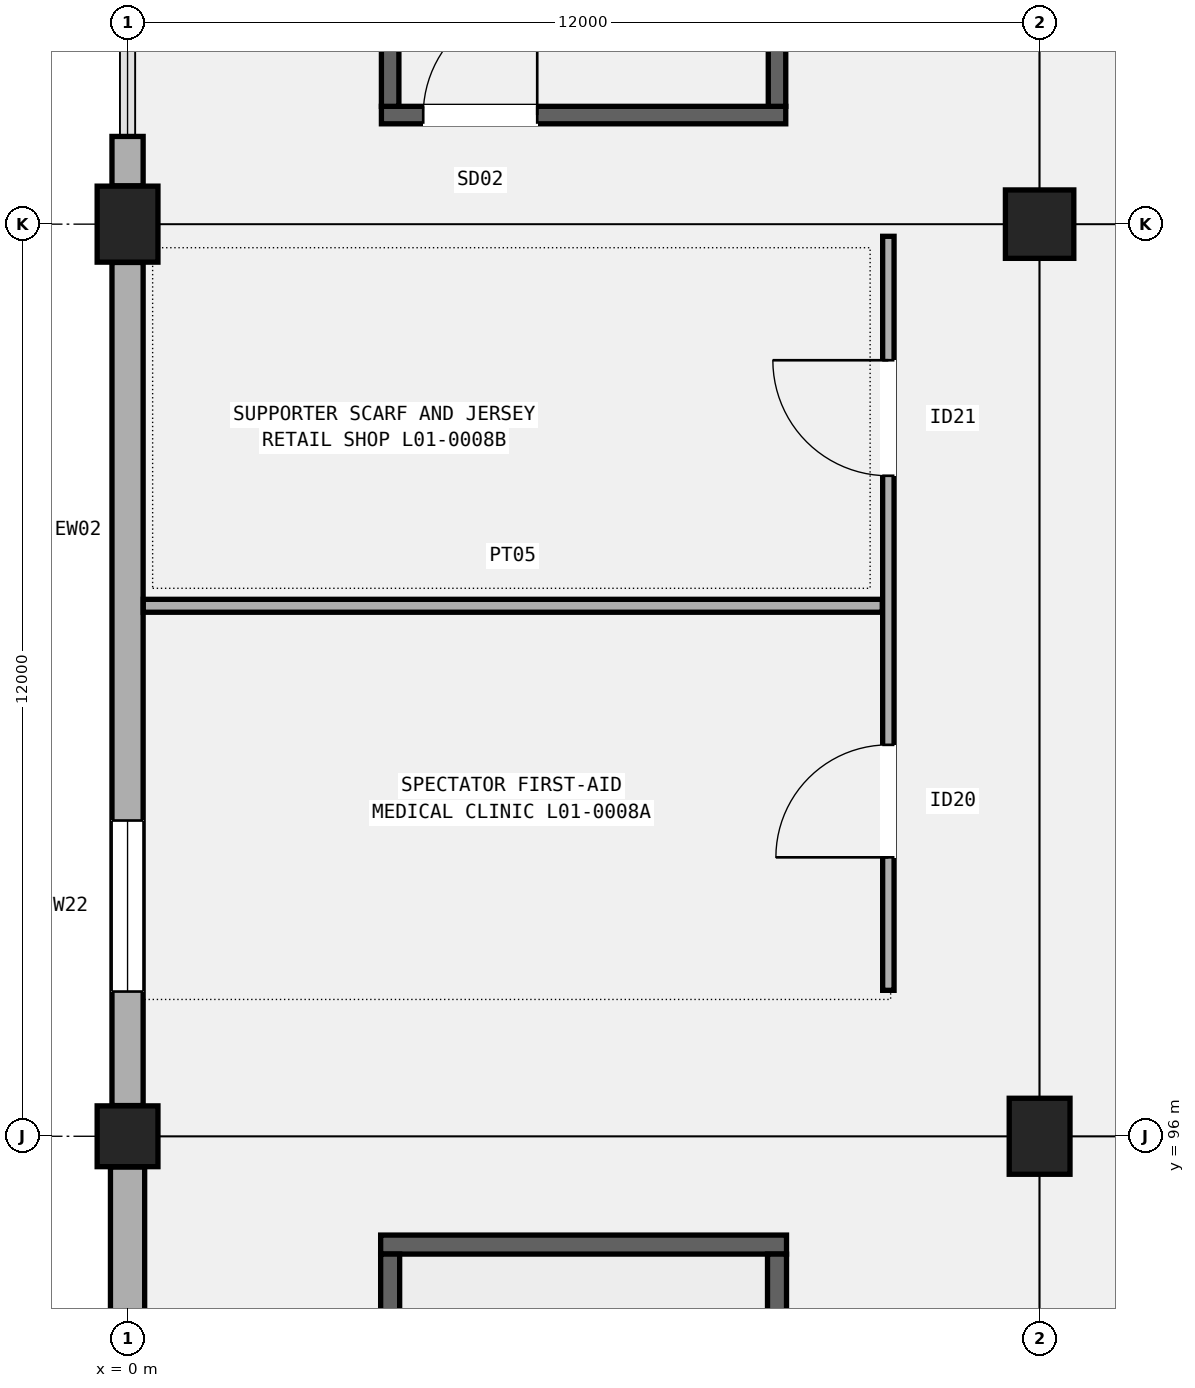
"""IFC4 building model, lengths in metres.
Left out: names, types, materials, properties, quantities, classifications, styles, units other than length and angle.
Written with IfcOpenShell. Run it as: python <this file> out.ifc"""

import sys

from ifc_helpers import new_model, si_unit, direction, frame, frame_2d, origin, origin_2d, place, context, subcontext, project, spatial, rectangle, extrude, element, fill, save


model = new_model("IFC4")
c1 = context("Model", 3, precision=1e-05, world=origin(), true_north=direction((0.0, 1.0)))
c2 = subcontext(c1, "Body", "Model", "MODEL_VIEW")
j1 = project(units=[si_unit("LENGTHUNIT", "METRE"), si_unit("PLANEANGLEUNIT", "RADIAN")], contexts=[c1])
p1 = place(None, origin())
s1 = spatial("IfcSite", under=j1, at=p1, CompositionType="ELEMENT")
p2 = place(p1, origin())
s2 = spatial("IfcBuilding", under=s1, at=p2, CompositionType="ELEMENT")
p3 = place(p2, frame((0.0, 0.0, 5.4)))
s3 = spatial("IfcBuildingStorey", under=s2, at=p3, CompositionType="ELEMENT", Elevation=5.4)
p4 = place(p3, frame((0.0, 96.0, 0.0), z_axis=(0.0, 0.0, 1.0), x_axis=(1.0, 0.0, 0.0)))
e1 = element("IfcColumn", 1, at=p4, inside=s3, PredefinedType="COLUMN", context=c2, shape_type="SweptSolid", body=[
    extrude(rectangle(XDim=0.8, YDim=0.8, at=origin_2d()), origin(), (0.0, 0.0, 1.0), 4.8),
])
for number, where, z_axis, x_axis in (
    (2, (0.0, 108.0, 0.0), (0.0, 0.0, 1.0), (1.0, 0.0, 0.0)),
    (3, (12.0, 96.0, 0.0), (0.0, 0.0, 1.0), (1.0, 0.0, 0.0)),
):
    element("IfcColumn", number, at=place(p3, frame(where, z_axis=z_axis, x_axis=x_axis)), inside=s3, PredefinedType="COLUMN", context=c2, shape_type="SweptSolid", body=[
        extrude(rectangle(XDim=0.8, YDim=1.0, at=origin_2d()), origin(), (0.0, 0.0, 1.0), 4.8),
    ])
p5 = place(p3, frame((12.0, 108.0, 0.0), z_axis=(0.0, 0.0, 1.0), x_axis=(1.0, 0.0, 0.0)))
e4 = element("IfcColumn", 4, at=p5, inside=s3, PredefinedType="COLUMN", context=c2, shape_type="SweptSolid", body=[
    extrude(rectangle(XDim=0.9, YDim=0.9, at=origin_2d()), origin(), (0.0, 0.0, 1.0), 4.8),
])
p6 = place(p3, frame((0.0, 84.454, 0.0), z_axis=(0.0, 0.0, 1.0), x_axis=(0.0, 1.0, 0.0)))
e5 = element("IfcWall", 5, at=p6, inside=s3, PredefinedType="SOLIDWALL", context=c2, shape_type="SweptSolid", body=[
    extrude(rectangle(XDim=11.142, YDim=0.45, at=frame_2d((5.571, 0.0))), origin(), (0.0, 0.0, 1.0), 4.2),
])
p7 = place(p6, frame((2.75, 0.0, 0.95)))
e6 = element("IfcOpeningElement", 6, at=p7, cuts=e5, PredefinedType="OPENING", context=c2, shape_type="SweptSolid", body=[
    extrude(rectangle(XDim=2.25, YDim=1.8, at=frame_2d((1.125, 0.9))), frame((0.0, 0.235, 0.0), z_axis=(0.0, -1.0, 0.0), x_axis=(1.0, 0.0, 0.0)), (0.0, 0.0, 1.0), 0.47),
])
p8 = place(p3, frame((0.0, 96.404, 0.0), z_axis=(0.0, 0.0, 1.0), x_axis=(0.0, 1.0, 0.0)))
e7 = element("IfcWall", 7, at=p8, inside=s3, PredefinedType="SOLIDWALL", context=c2, shape_type="SweptSolid", body=[
    extrude(rectangle(XDim=11.092, YDim=0.41, at=frame_2d((5.546, 0.0))), origin(), (0.0, 0.0, 1.0), 4.15),
])
p9 = place(p8, frame((1.5, 0.0, 0.95)))
e8 = element("IfcOpeningElement", 8, at=p9, cuts=e7, PredefinedType="OPENING", context=c2, shape_type="SweptSolid", body=[
    extrude(rectangle(XDim=2.25, YDim=2.2, at=frame_2d((1.125, 1.1))), frame((0.0, 0.215, 0.0), z_axis=(0.0, -1.0, 0.0), x_axis=(1.0, 0.0, 0.0)), (0.0, 0.0, 1.0), 0.43),
])
p10 = place(p3, frame((0.0, 108.504, 0.0), z_axis=(0.0, 0.0, 1.0), x_axis=(0.0, 1.0, 0.0)))
e9 = element("IfcWall", 9, at=p10, inside=s3, PredefinedType="SOLIDWALL", context=c2, shape_type="SweptSolid", body=[
    extrude(rectangle(XDim=0.65, YDim=0.41, at=frame_2d((0.325, 0.0))), origin(), (0.0, 0.0, 1.0), 4.2),
])
p11 = place(p3, frame((3.33, 94.575, 0.0), z_axis=(0.0, 0.0, 1.0), x_axis=(1.0, 0.0, 0.0)))
e10 = element("IfcWall", 10, at=p11, inside=s3, PredefinedType="SHEAR", context=c2, shape_type="SweptSolid", body=[
    extrude(rectangle(XDim=5.34, YDim=0.25, at=frame_2d((2.67, 0.0))), origin(), (0.0, 0.0, 1.0), 4.55),
])
for number, where, z_axis, x_axis in (
    (11, (3.455, 85.55, 0.0), (0.0, 0.0, 1.0), (0.0, 1.0, 0.0)),
    (12, (8.545, 85.55, 0.0), (0.0, 0.0, 1.0), (0.0, 1.0, 0.0)),
):
    element("IfcWall", number, at=place(p3, frame(where, z_axis=z_axis, x_axis=x_axis)), inside=s3, PredefinedType="SHEAR", context=c2, shape_type="SweptSolid", body=[
        extrude(rectangle(XDim=8.9, YDim=0.25, at=frame_2d((4.45, 0.0))), origin(), (0.0, 0.0, 1.0), 4.55),
    ])
p12 = place(p3, frame((3.34, 109.435, 0.0), z_axis=(0.0, 0.0, 1.0), x_axis=(1.0, 0.0, 0.0)))
e13 = element("IfcWall", 13, at=p12, inside=s3, PredefinedType="SHEAR", context=c2, shape_type="SweptSolid", body=[
    extrude(rectangle(XDim=5.32, YDim=0.23, at=frame_2d((2.66, 0.0))), origin(), (0.0, 0.0, 1.0), 4.55),
])
p13 = place(p12, frame((0.55, 0.0, 0.0)))
e14 = element("IfcOpeningElement", 14, at=p13, cuts=e13, PredefinedType="OPENING", context=c2, shape_type="SweptSolid", body=[
    extrude(rectangle(XDim=1.5, YDim=2.2, at=frame_2d((0.75, 1.1))), frame((0.0, 0.125, 0.0), z_axis=(0.0, -1.0, 0.0), x_axis=(1.0, 0.0, 0.0)), (0.0, 0.0, 1.0), 0.25),
])
for number, where, z_axis, x_axis in (
    (15, (3.455, 109.55, 0.0), (0.0, 0.0, 1.0), (0.0, 1.0, 0.0)),
    (16, (8.545, 109.55, 0.0), (0.0, 0.0, 1.0), (0.0, 1.0, 0.0)),
):
    element("IfcWall", number, at=place(p3, frame(where, z_axis=z_axis, x_axis=x_axis)), inside=s3, PredefinedType="SHEAR", context=c2, shape_type="SweptSolid", body=[
        extrude(rectangle(XDim=8.9, YDim=0.23, at=frame_2d((4.45, 0.0))), origin(), (0.0, 0.0, 1.0), 4.55),
    ])
p14 = place(p3, frame((10.01, 97.92, 0.0), z_axis=(0.0, 0.0, 1.0), x_axis=(0.0, 1.0, 0.0)))
e17 = element("IfcWall", 17, at=p14, inside=s3, PredefinedType="PARTITIONING", context=c2, shape_type="SweptSolid", body=[
    extrude(rectangle(XDim=9.92, YDim=0.15, at=frame_2d((4.96, 0.0))), origin(), (0.0, 0.0, 1.0), 3.92),
])
p15 = place(p14, frame((1.75, 0.0, 0.0)))
e18 = element("IfcOpeningElement", 18, at=p15, cuts=e17, PredefinedType="OPENING", context=c2, shape_type="SweptSolid", body=[
    extrude(rectangle(XDim=1.48, YDim=2.24, at=frame_2d((0.74, 1.12))), frame((0.0, 0.085, 0.0), z_axis=(0.0, -1.0, 0.0), x_axis=(1.0, 0.0, 0.0)), (0.0, 0.0, 1.0), 0.17),
])
p16 = place(p14, frame((6.77, 0.0, 0.0)))
e19 = element("IfcOpeningElement", 19, at=p16, cuts=e17, PredefinedType="OPENING", context=c2, shape_type="SweptSolid", body=[
    extrude(rectangle(XDim=1.52, YDim=2.28, at=frame_2d((0.76, 1.14))), frame((0.0, 0.085, 0.0), z_axis=(0.0, -1.0, 0.0), x_axis=(1.0, 0.0, 0.0)), (0.0, 0.0, 1.0), 0.17),
])
p17 = place(p3, frame((0.207, 102.979, 0.0), z_axis=(0.0, 0.0, 1.0), x_axis=(1.0, 0.0, 0.0)))
e20 = element("IfcWall", 20, at=p17, inside=s3, PredefinedType="PARTITIONING", context=c2, shape_type="SweptSolid", body=[
    extrude(rectangle(XDim=9.723, YDim=0.17, at=frame_2d((4.861, 0.0))), origin(), (0.0, 0.0, 1.0), 3.92),
])
p18 = place(p9, origin())
e21 = element("IfcWindow", 21, at=p18, inside=s3, PartitioningType="SINGLE_PANEL", PredefinedType="WINDOW", context=c2, shape_type="SweptSolid", body=[
    extrude(rectangle(XDim=2.25, YDim=2.2, at=frame_2d((1.125, 1.1))), frame((0.0, 0.03, 0.0), z_axis=(0.0, -1.0, 0.0), x_axis=(1.0, 0.0, 0.0)), (0.0, 0.0, 1.0), 0.06),
])
fill(e8, e21)
p19 = place(p13, origin())
e22 = element("IfcDoor", 22, at=p19, inside=s3, OperationType="SINGLE_SWING_RIGHT", PredefinedType="DOOR", context=c2, shape_type="SweptSolid", body=[
    extrude(rectangle(XDim=1.5, YDim=2.2, at=frame_2d((0.75, 1.1))), frame((0.0, 0.025, 0.0), z_axis=(0.0, -1.0, 0.0), x_axis=(1.0, 0.0, 0.0)), (0.0, 0.0, 1.0), 0.05),
])
fill(e14, e22)
p20 = place(p15, origin())
e23 = element("IfcDoor", 23, at=p20, inside=s3, OperationType="SINGLE_SWING_LEFT", PredefinedType="DOOR", context=c2, shape_type="SweptSolid", body=[
    extrude(rectangle(XDim=1.48, YDim=2.24, at=frame_2d((0.74, 1.12))), frame((0.0, 0.025, 0.0), z_axis=(0.0, -1.0, 0.0), x_axis=(1.0, 0.0, 0.0)), (0.0, 0.0, 1.0), 0.05),
])
fill(e18, e23)
p21 = place(p16, origin())
e24 = element("IfcDoor", 24, at=p21, inside=s3, OperationType="SINGLE_SWING_RIGHT", PredefinedType="DOOR", context=c2, shape_type="SweptSolid", body=[
    extrude(rectangle(XDim=1.52, YDim=2.28, at=frame_2d((0.76, 1.14))), frame((0.0, 0.025, 0.0), z_axis=(0.0, -1.0, 0.0), x_axis=(1.0, 0.0, 0.0)), (0.0, 0.0, 1.0), 0.05),
])
fill(e19, e24)
save(model, sys.argv[1])
